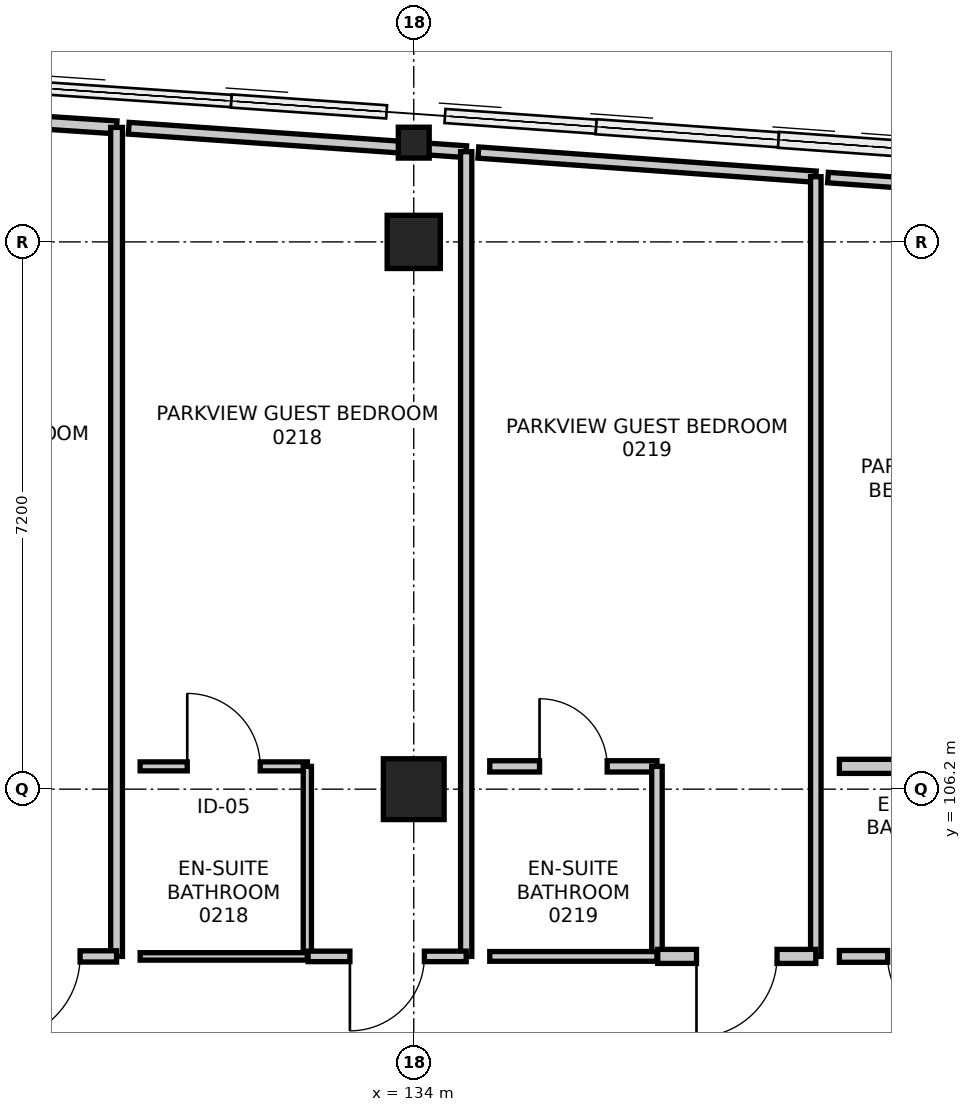
"""IFC4 building model, lengths in metres.
Left out: names, types, materials, properties, quantities, classifications, styles, units other than length and angle.
Written with IfcOpenShell. Run it as: python <this file> out.ifc"""

import sys

from ifc_helpers import new_model, si_unit, direction, frame, frame_2d, origin, origin_2d, place, context, subcontext, project, spatial, rectangle, hollow_circle, extrude, element, fill, save


model = new_model("IFC4")
c1 = context("Model", 3, precision=1e-05, world=origin(), true_north=direction((0.0, 1.0)))
c2 = subcontext(c1, "Body", "Model", "MODEL_VIEW")
j1 = project(units=[si_unit("LENGTHUNIT", "METRE"), si_unit("PLANEANGLEUNIT", "RADIAN")], contexts=[c1])
p1 = place(None, origin())
s1 = spatial("IfcSite", under=j1, at=p1, CompositionType="ELEMENT")
p2 = place(p1, origin())
s2 = spatial("IfcBuilding", under=s1, at=p2, CompositionType="ELEMENT")
p3 = place(p2, frame((0.0, 0.0, 10.5)))
s3 = spatial("IfcBuildingStorey", under=s2, at=p3, CompositionType="ELEMENT", Elevation=10.5)
p4 = place(p3, frame((134.0, 106.2, 0.0), z_axis=(0.0, 0.0, 1.0), x_axis=(1.0, 0.0, 0.0)))
e1 = element("IfcColumn", 1, at=p4, inside=s3, PredefinedType="COLUMN", context=c2, shape_type="SweptSolid", body=[
    extrude(rectangle(XDim=0.8, YDim=0.8, at=origin_2d()), origin(), (0.0, 0.0, 1.0), 4.5),
])
p5 = place(p3, frame((134.0, 113.4, 0.0), z_axis=(0.0, 0.0, 1.0), x_axis=(1.0, 0.0, 0.0)))
e2 = element("IfcColumn", 2, at=p5, inside=s3, PredefinedType="COLUMN", context=c2, shape_type="SweptSolid", body=[
    extrude(rectangle(XDim=0.7, YDim=0.7, at=origin_2d()), origin(), (0.0, 0.0, 1.0), 4.5),
])
p6 = place(p3, frame((134.0, 114.706, 0.0), z_axis=(0.0, 0.0, 1.0), x_axis=(1.0, 0.0, 0.0)))
e3 = element("IfcColumn", 3, at=p6, inside=s3, PredefinedType="COLUMN", context=c2, shape_type="SweptSolid", body=[
    extrude(hollow_circle(Radius=0.203, WallThickness=0.02, at=origin_2d()), origin(), (0.0, 0.0, 1.0), 4.5),
])
p7 = place(p3, frame((125.65, 115.196, 0.0), z_axis=(0.0, 0.0, 1.0), x_axis=(0.997876928912, -0.065127833871, 0.0)))
e4 = element("IfcWall", 4, at=p7, inside=s3, PredefinedType="PARTITIONING", context=c2, shape_type="SweptSolid", body=[
    extrude(rectangle(XDim=4.45, YDim=0.17, at=frame_2d((2.225, 0.0))), origin(), (0.0, 0.0, 1.0), 3.796),
])
p8 = place(p3, frame((130.09, 114.906, 0.0), z_axis=(0.0, 0.0, 1.0), x_axis=(0.0, -1.0, 0.0)))
e5 = element("IfcWall", 5, at=p8, inside=s3, PredefinedType="PARTITIONING", context=c2, shape_type="SweptSolid", body=[
    extrude(rectangle(XDim=10.906, YDim=0.155, at=frame_2d((5.453, 0.0))), origin(), (0.0, 0.0, 1.0), 3.455),
])
p9 = place(p3, frame((130.09, 104.0, 0.0), z_axis=(0.0, 0.0, 1.0), x_axis=(-1.0, 0.0, 0.0)))
e6 = element("IfcWall", 6, at=p9, inside=s3, PredefinedType="PARTITIONING", context=c2, shape_type="SweptSolid", body=[
    extrude(rectangle(XDim=2.08, YDim=0.148, at=frame_2d((1.04, 0.0))), origin(), (0.0, 0.0, 1.0), 4.22),
])
p10 = place(p9, frame((0.48, 0.0, 0.0)))
e7 = element("IfcOpeningElement", 7, at=p10, cuts=e6, PredefinedType="OPENING", context=c2, shape_type="SweptSolid", body=[
    extrude(rectangle(XDim=1.12, YDim=2.2, at=frame_2d((0.56, 1.1))), frame((0.0, 0.084, 0.0), z_axis=(0.0, -1.0, 0.0), x_axis=(1.0, 0.0, 0.0)), (0.0, 0.0, 1.0), 0.168),
])
p11 = place(p3, frame((130.4, 106.5, 0.0), z_axis=(0.0, 0.0, 1.0), x_axis=(1.0, 0.0, 0.0)))
e8 = element("IfcWall", 8, at=p11, inside=s3, PredefinedType="PARTITIONING", context=c2, shape_type="SweptSolid", body=[
    extrude(rectangle(XDim=2.2, YDim=0.118, at=frame_2d((1.1, 0.0))), origin(), (0.0, 0.0, 1.0), 3.455),
])
p12 = place(p11, frame((0.62, 0.0, 0.0)))
e9 = element("IfcOpeningElement", 9, at=p12, cuts=e8, PredefinedType="OPENING", context=c2, shape_type="SweptSolid", body=[
    extrude(rectangle(XDim=0.96, YDim=2.14, at=frame_2d((0.48, 1.07))), frame((0.0, 0.069, 0.0), z_axis=(0.0, -1.0, 0.0), x_axis=(1.0, 0.0, 0.0)), (0.0, 0.0, 1.0), 0.138),
])
p13 = place(p3, frame((132.6, 106.5, 0.0), z_axis=(0.0, 0.0, 1.0), x_axis=(0.0, -1.0, 0.0)))
e10 = element("IfcWall", 10, at=p13, inside=s3, PredefinedType="PARTITIONING", context=c2, shape_type="SweptSolid", body=[
    extrude(rectangle(XDim=2.5, YDim=0.108, at=frame_2d((1.25, 0.0))), origin(), (0.0, 0.0, 1.0), 3.455),
])
p14 = place(p3, frame((132.6, 104.0, 0.0), z_axis=(0.0, 0.0, 1.0), x_axis=(-1.0, 0.0, 0.0)))
e11 = element("IfcWall", 11, at=p14, inside=s3, PredefinedType="PARTITIONING", context=c2, shape_type="SweptSolid", body=[
    extrude(rectangle(XDim=2.2, YDim=0.098, at=frame_2d((1.1, 0.0))), origin(), (0.0, 0.0, 1.0), 4.22),
])
p15 = place(p3, frame((130.25, 114.896, 0.0), z_axis=(0.0, 0.0, 1.0), x_axis=(0.997593312197, -0.069336739614, 0.0)))
e12 = element("IfcWall", 12, at=p15, inside=s3, PredefinedType="PARTITIONING", context=c2, shape_type="SweptSolid", body=[
    extrude(rectangle(XDim=4.451, YDim=0.155, at=frame_2d((2.225, 0.0))), origin(), (0.0, 0.0, 1.0), 3.796),
])
p16 = place(p3, frame((134.69, 114.587, 0.0), z_axis=(0.0, 0.0, 1.0), x_axis=(0.0, -1.0, 0.0)))
e13 = element("IfcWall", 13, at=p16, inside=s3, PredefinedType="PARTITIONING", context=c2, shape_type="SweptSolid", body=[
    extrude(rectangle(XDim=10.587, YDim=0.148, at=frame_2d((5.293, 0.0))), origin(), (0.0, 0.0, 1.0), 3.455),
])
p17 = place(p3, frame((134.69, 104.0, 0.0), z_axis=(0.0, 0.0, 1.0), x_axis=(-1.0, 0.0, 0.0)))
e14 = element("IfcWall", 14, at=p17, inside=s3, PredefinedType="PARTITIONING", context=c2, shape_type="SweptSolid", body=[
    extrude(rectangle(XDim=2.08, YDim=0.138, at=frame_2d((1.04, 0.0))), origin(), (0.0, 0.0, 1.0), 3.555),
])
p18 = place(p17, frame((0.55, 0.0, 0.0)))
e15 = element("IfcOpeningElement", 15, at=p18, cuts=e14, PredefinedType="OPENING", context=c2, shape_type="SweptSolid", body=[
    extrude(rectangle(XDim=0.98, YDim=2.15, at=frame_2d((0.49, 1.075))), frame((0.0, 0.079, 0.0), z_axis=(0.0, -1.0, 0.0), x_axis=(1.0, 0.0, 0.0)), (0.0, 0.0, 1.0), 0.158),
])
p19 = place(p3, frame((135.0, 106.5, 0.0), z_axis=(0.0, 0.0, 1.0), x_axis=(1.0, 0.0, 0.0)))
e16 = element("IfcWall", 16, at=p19, inside=s3, PredefinedType="PARTITIONING", context=c2, shape_type="SweptSolid", body=[
    extrude(rectangle(XDim=2.2, YDim=0.148, at=frame_2d((1.1, 0.0))), origin(), (0.0, 0.0, 1.0), 3.455),
])
p20 = place(p19, frame((0.655, 0.0, 0.0)))
e17 = element("IfcOpeningElement", 17, at=p20, cuts=e16, PredefinedType="OPENING", context=c2, shape_type="SweptSolid", body=[
    extrude(rectangle(XDim=0.89, YDim=2.09, at=frame_2d((0.445, 1.045))), frame((0.0, 0.084, 0.0), z_axis=(0.0, -1.0, 0.0), x_axis=(1.0, 0.0, 0.0)), (0.0, 0.0, 1.0), 0.168),
])
p21 = place(p3, frame((137.2, 106.5, 0.0), z_axis=(0.0, 0.0, 1.0), x_axis=(0.0, -1.0, 0.0)))
e18 = element("IfcWall", 18, at=p21, inside=s3, PredefinedType="PARTITIONING", context=c2, shape_type="SweptSolid", body=[
    extrude(rectangle(XDim=2.5, YDim=0.138, at=frame_2d((1.25, 0.0))), origin(), (0.0, 0.0, 1.0), 3.455),
])
p22 = place(p3, frame((137.2, 104.0, 0.0), z_axis=(0.0, 0.0, 1.0), x_axis=(-1.0, 0.0, 0.0)))
e19 = element("IfcWall", 19, at=p22, inside=s3, PredefinedType="PARTITIONING", context=c2, shape_type="SweptSolid", body=[
    extrude(rectangle(XDim=2.2, YDim=0.128, at=frame_2d((1.1, 0.0))), origin(), (0.0, 0.0, 1.0), 4.22),
])
p23 = place(p3, frame((134.85, 114.575, 0.0), z_axis=(0.0, 0.0, 1.0), x_axis=(0.997454800553, -0.071301618867, 0.0)))
e20 = element("IfcWall", 20, at=p23, inside=s3, PredefinedType="PARTITIONING", context=c2, shape_type="SweptSolid", body=[
    extrude(rectangle(XDim=4.451, YDim=0.148, at=frame_2d((2.226, 0.0))), origin(), (0.0, 0.0, 1.0), 3.796),
])
p24 = place(p3, frame((139.29, 114.258, 0.0), z_axis=(0.0, 0.0, 1.0), x_axis=(0.0, -1.0, 0.0)))
e21 = element("IfcWall", 21, at=p24, inside=s3, PredefinedType="PARTITIONING", context=c2, shape_type="SweptSolid", body=[
    extrude(rectangle(XDim=10.258, YDim=0.138, at=frame_2d((5.129, 0.0))), origin(), (0.0, 0.0, 1.0), 3.455),
])
p25 = place(p3, frame((139.29, 104.0, 0.0), z_axis=(0.0, 0.0, 1.0), x_axis=(-1.0, 0.0, 0.0)))
e22 = element("IfcWall", 22, at=p25, inside=s3, PredefinedType="PARTITIONING", context=c2, shape_type="SweptSolid", body=[
    extrude(rectangle(XDim=2.08, YDim=0.185, at=frame_2d((1.04, 0.0))), origin(), (0.0, 0.0, 1.0), 4.22),
])
p26 = place(p25, frame((0.51, 0.0, 0.0)))
e23 = element("IfcOpeningElement", 23, at=p26, cuts=e22, PredefinedType="OPENING", context=c2, shape_type="SweptSolid", body=[
    extrude(rectangle(XDim=1.06, YDim=2.2, at=frame_2d((0.53, 1.1))), frame((0.0, 0.103, 0.0), z_axis=(0.0, -1.0, 0.0), x_axis=(1.0, 0.0, 0.0)), (0.0, 0.0, 1.0), 0.205),
])
p27 = place(p3, frame((139.6, 106.5, 0.0), z_axis=(0.0, 0.0, 1.0), x_axis=(1.0, 0.0, 0.0)))
e24 = element("IfcWall", 24, at=p27, inside=s3, PredefinedType="PARTITIONING", context=c2, shape_type="SweptSolid", body=[
    extrude(rectangle(XDim=2.2, YDim=0.185, at=frame_2d((1.1, 0.0))), origin(), (0.0, 0.0, 1.0), 3.455),
])
p28 = place(p3, frame((141.8, 104.0, 0.0), z_axis=(0.0, 0.0, 1.0), x_axis=(-1.0, 0.0, 0.0)))
e25 = element("IfcWall", 25, at=p28, inside=s3, PredefinedType="PARTITIONING", context=c2, shape_type="SweptSolid", body=[
    extrude(rectangle(XDim=2.2, YDim=0.155, at=frame_2d((1.1, 0.0))), origin(), (0.0, 0.0, 1.0), 3.555),
])
p29 = place(p28, frame((0.635, 0.0, 0.0)))
e26 = element("IfcOpeningElement", 26, at=p29, cuts=e25, PredefinedType="OPENING", context=c2, shape_type="SweptSolid", body=[
    extrude(rectangle(XDim=0.93, YDim=2.13, at=frame_2d((0.465, 1.065))), frame((0.0, 0.087, 0.0), z_axis=(0.0, -1.0, 0.0), x_axis=(1.0, 0.0, 0.0)), (0.0, 0.0, 1.0), 0.175),
])
p30 = place(p3, frame((139.45, 114.247, 0.0), z_axis=(0.0, 0.0, 1.0), x_axis=(0.997489787664, -0.070810475964, 0.0)))
e27 = element("IfcWall", 27, at=p30, inside=s3, PredefinedType="PARTITIONING", context=c2, shape_type="SweptSolid", body=[
    extrude(rectangle(XDim=4.451, YDim=0.138, at=frame_2d((2.226, 0.0))), origin(), (0.0, 0.0, 1.0), 3.796),
])
p31 = place(p10, origin())
e28 = element("IfcDoor", 28, at=p31, inside=s3, OperationType="SINGLE_SWING_RIGHT", PredefinedType="DOOR", context=c2, shape_type="SweptSolid", body=[
    extrude(rectangle(XDim=1.12, YDim=2.2, at=frame_2d((0.56, 1.1))), frame((0.0, 0.025, 0.0), z_axis=(0.0, -1.0, 0.0), x_axis=(1.0, 0.0, 0.0)), (0.0, 0.0, 1.0), 0.05),
])
fill(e7, e28)
p32 = place(p12, origin())
e29 = element("IfcDoor", 29, at=p32, inside=s3, OperationType="SINGLE_SWING_LEFT", PredefinedType="DOOR", context=c2, shape_type="SweptSolid", body=[
    extrude(rectangle(XDim=0.96, YDim=2.14, at=frame_2d((0.48, 1.07))), frame((0.0, 0.025, 0.0), z_axis=(0.0, -1.0, 0.0), x_axis=(1.0, 0.0, 0.0)), (0.0, 0.0, 1.0), 0.05),
])
fill(e9, e29)
p33 = place(p18, origin())
e30 = element("IfcDoor", 30, at=p33, inside=s3, OperationType="SINGLE_SWING_RIGHT", PredefinedType="DOOR", context=c2, shape_type="SweptSolid", body=[
    extrude(rectangle(XDim=0.98, YDim=2.15, at=frame_2d((0.49, 1.075))), frame((0.0, 0.025, 0.0), z_axis=(0.0, -1.0, 0.0), x_axis=(1.0, 0.0, 0.0)), (0.0, 0.0, 1.0), 0.05),
])
fill(e15, e30)
p34 = place(p20, origin())
e31 = element("IfcDoor", 31, at=p34, inside=s3, OperationType="SINGLE_SWING_LEFT", PredefinedType="DOOR", context=c2, shape_type="SweptSolid", body=[
    extrude(rectangle(XDim=0.89, YDim=2.09, at=frame_2d((0.445, 1.045))), frame((0.0, 0.025, 0.0), z_axis=(0.0, -1.0, 0.0), x_axis=(1.0, 0.0, 0.0)), (0.0, 0.0, 1.0), 0.05),
])
fill(e17, e31)
p35 = place(p26, origin())
e32 = element("IfcDoor", 32, at=p35, inside=s3, OperationType="SINGLE_SWING_RIGHT", PredefinedType="DOOR", context=c2, shape_type="SweptSolid", body=[
    extrude(rectangle(XDim=1.06, YDim=2.2, at=frame_2d((0.53, 1.1))), frame((0.0, 0.025, 0.0), z_axis=(0.0, -1.0, 0.0), x_axis=(1.0, 0.0, 0.0)), (0.0, 0.0, 1.0), 0.05),
])
fill(e23, e32)
p36 = place(p29, origin())
e33 = element("IfcDoor", 33, at=p36, inside=s3, OperationType="SINGLE_SWING_LEFT", PredefinedType="DOOR", context=c2, shape_type="SweptSolid", body=[
    extrude(rectangle(XDim=0.93, YDim=2.13, at=frame_2d((0.465, 1.065))), frame((0.0, 0.025, 0.0), z_axis=(0.0, -1.0, 0.0), x_axis=(1.0, 0.0, 0.0)), (0.0, 0.0, 1.0), 0.05),
])
fill(e26, e33)
save(model, sys.argv[1])
